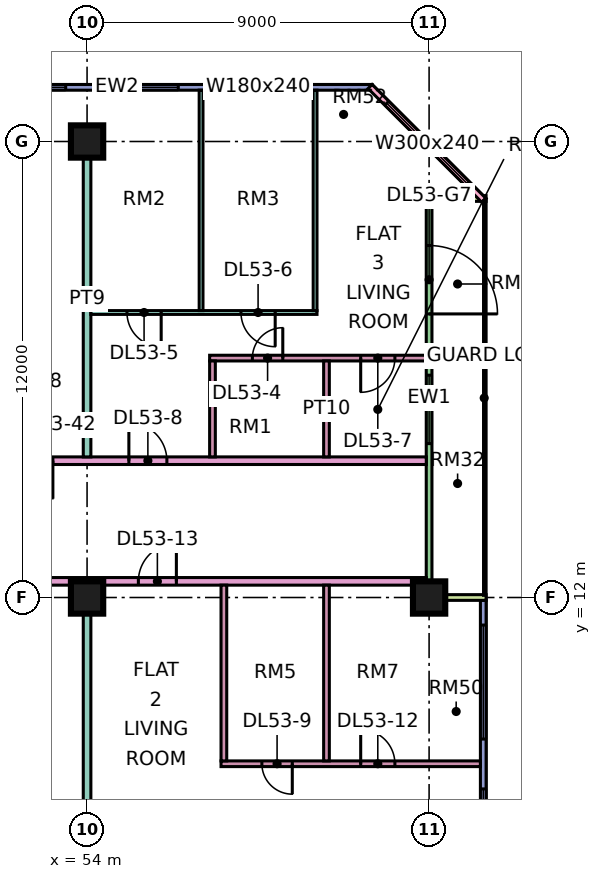
"""IFC4 building model, lengths in metres.
Left out: names, types, materials, properties, quantities, classifications, styles, units other than length and angle.
Written with IfcOpenShell. Run it as: python <this file> out.ifc"""

import sys

from ifc_helpers import new_model, si_unit, direction, frame, frame_2d, origin, origin_2d, place, context, subcontext, project, spatial, rectangle, extrude, element, fill, save


model = new_model("IFC4")
c1 = context("Model", 3, precision=1e-05, world=origin(), true_north=direction((0.0, 1.0)))
c2 = subcontext(c1, "Body", "Model", "MODEL_VIEW")
j1 = project(units=[si_unit("LENGTHUNIT", "METRE"), si_unit("PLANEANGLEUNIT", "RADIAN")], contexts=[c1])
p1 = place(None, origin())
s1 = spatial("IfcSite", under=j1, at=p1, CompositionType="ELEMENT")
p2 = place(p1, origin())
s2 = spatial("IfcBuilding", under=s1, at=p2, CompositionType="ELEMENT")
p3 = place(p2, frame((0.0, 0.0, 226.65)))
s3 = spatial("IfcBuildingStorey", under=s2, at=p3, CompositionType="ELEMENT", Elevation=226.65)
for number, where, z_axis, x_axis in (
    (1, (54.0, 12.0, 0.0), (0.0, 0.0, 1.0), (1.0, 0.0, 0.0)),
    (2, (54.0, 24.0, 0.0), (0.0, 0.0, 1.0), (1.0, 0.0, 0.0)),
    (3, (63.0, 12.0, 0.0), (0.0, 0.0, 1.0), (1.0, 0.0, 0.0)),
):
    element("IfcColumn", number, at=place(p3, frame(where, z_axis=z_axis, x_axis=x_axis)), inside=s3, PredefinedType="COLUMN", context=c2, shape_type="SweptSolid", body=[
        extrude(rectangle(XDim=0.85, YDim=0.85, at=origin_2d()), origin(), (0.0, 0.0, 1.0), 3.75),
    ])
p4 = place(p3, frame((61.5, 25.425, 0.0), z_axis=(0.0, 0.0, 1.0), x_axis=(-1.0, 0.0, 0.0)))
e4 = element("IfcWall", 4, at=p4, inside=s3, PredefinedType="SOLIDWALL", context=c2, shape_type="SweptSolid", body=[
    extrude(rectangle(XDim=13.425, YDim=0.15, at=frame_2d((6.712, 0.0))), origin(), (0.0, 0.0, 1.0), 3.35),
])
p5 = place(p4, frame((2.1, 0.0, 0.45)))
e5 = element("IfcOpeningElement", 5, at=p5, cuts=e4, PredefinedType="OPENING", context=c2, shape_type="SweptSolid", body=[
    extrude(rectangle(XDim=1.8, YDim=2.4, at=frame_2d((0.9, 1.2))), frame((0.0, 0.085, 0.0), z_axis=(0.0, -1.0, 0.0), x_axis=(1.0, 0.0, 0.0)), (0.0, 0.0, 1.0), 0.17),
])
p6 = place(p4, frame((5.1, 0.0, 0.45)))
e6 = element("IfcOpeningElement", 6, at=p6, cuts=e4, PredefinedType="OPENING", context=c2, shape_type="SweptSolid", body=[
    extrude(rectangle(XDim=1.8, YDim=2.4, at=frame_2d((0.9, 1.2))), frame((0.0, 0.085, 0.0), z_axis=(0.0, -1.0, 0.0), x_axis=(1.0, 0.0, 0.0)), (0.0, 0.0, 1.0), 0.17),
])
p7 = place(p4, frame((8.062, 0.0, 0.45)))
e7 = element("IfcOpeningElement", 7, at=p7, cuts=e4, PredefinedType="OPENING", context=c2, shape_type="SweptSolid", body=[
    extrude(rectangle(XDim=4.8, YDim=2.4, at=frame_2d((2.4, 1.2))), frame((0.0, 0.085, 0.0), z_axis=(0.0, -1.0, 0.0), x_axis=(1.0, 0.0, 0.0)), (0.0, 0.0, 1.0), 0.17),
])
p8 = place(p3, frame((64.425, 1.5, 0.0), z_axis=(0.0, 0.0, 1.0), x_axis=(0.0, 1.0, 0.0)))
e8 = element("IfcWall", 8, at=p8, inside=s3, PredefinedType="SOLIDWALL", context=c2, shape_type="SweptSolid", body=[
    extrude(rectangle(XDim=10.425, YDim=0.15, at=frame_2d((5.212, 0.0))), origin(), (0.0, 0.0, 1.0), 3.35),
])
p9 = place(p8, frame((0.663, 0.0, 0.45)))
e9 = element("IfcOpeningElement", 9, at=p9, cuts=e8, PredefinedType="OPENING", context=c2, shape_type="SweptSolid", body=[
    extrude(rectangle(XDim=4.8, YDim=2.4, at=frame_2d((2.4, 1.2))), frame((0.0, 0.085, 0.0), z_axis=(0.0, -1.0, 0.0), x_axis=(1.0, 0.0, 0.0)), (0.0, 0.0, 1.0), 0.17),
])
p10 = place(p8, frame((6.775, 0.0, 0.45)))
e10 = element("IfcOpeningElement", 10, at=p10, cuts=e8, PredefinedType="OPENING", context=c2, shape_type="SweptSolid", body=[
    extrude(rectangle(XDim=3.0, YDim=2.4, at=frame_2d((1.5, 1.2))), frame((0.0, 0.085, 0.0), z_axis=(0.0, -1.0, 0.0), x_axis=(1.0, 0.0, 0.0)), (0.0, 0.0, 1.0), 0.17),
])
p11 = place(p3, frame((63.0, 12.075, 0.0), z_axis=(0.0, 0.0, 1.0), x_axis=(0.0, 1.0, 0.0)))
e11 = element("IfcWall", 11, at=p11, inside=s3, PredefinedType="SOLIDWALL", context=c2, shape_type="SweptSolid", body=[
    extrude(rectangle(XDim=10.35, YDim=0.15, at=frame_2d((5.175, 0.0))), origin(), (0.0, 0.0, 1.0), 3.35),
])
p12 = place(p11, frame((3.975, 0.0, 0.45)))
e12 = element("IfcOpeningElement", 12, at=p12, cuts=e11, PredefinedType="OPENING", context=c2, shape_type="SweptSolid", body=[
    extrude(rectangle(XDim=1.8, YDim=2.4, at=frame_2d((0.9, 1.2))), frame((0.0, 0.085, 0.0), z_axis=(0.0, -1.0, 0.0), x_axis=(1.0, 0.0, 0.0)), (0.0, 0.0, 1.0), 0.17),
])
p13 = place(p11, frame((7.387, 0.0, 0.0)))
e13 = element("IfcOpeningElement", 13, at=p13, cuts=e11, PredefinedType="OPENING", context=c2, shape_type="SweptSolid", body=[
    extrude(rectangle(XDim=1.8, YDim=2.4, at=frame_2d((0.9, 1.2))), frame((0.0, 0.085, 0.0), z_axis=(0.0, -1.0, 0.0), x_axis=(1.0, 0.0, 0.0)), (0.0, 0.0, 1.0), 0.17),
])
for number, where, z_axis, x_axis in (
    (14, (64.5, 12.0, 0.0), (0.0, 0.0, 1.0), (-1.0, 0.0, 0.0)),
    (15, (64.5, 22.5, 0.0), (0.0, 0.0, 1.0), (-1.0, 0.0, 0.0)),
):
    element("IfcWall", number, at=place(p3, frame(where, z_axis=z_axis, x_axis=x_axis)), inside=s3, PredefinedType="SOLIDWALL", context=c2, shape_type="SweptSolid", body=[
        extrude(rectangle(XDim=1.5, YDim=0.15, at=frame_2d((0.75, 0.0))), origin(), (0.0, 0.0, 1.0), 3.35),
    ])
p14 = place(p3, frame((64.447, 22.447, 0.0), z_axis=(0.0, 0.0, 1.0), x_axis=(-0.707106781187, 0.707106781187, 0.0)))
e16 = element("IfcWall", 16, at=p14, inside=s3, PredefinedType="SOLIDWALL", context=c2, shape_type="SweptSolid", body=[
    extrude(rectangle(XDim=4.243, YDim=0.15, at=frame_2d((2.121, 0.0))), origin(), (0.0, 0.0, 1.0), 3.35),
])
p15 = place(p14, frame((0.621, 0.0, 0.45)))
e17 = element("IfcOpeningElement", 17, at=p15, cuts=e16, PredefinedType="OPENING", context=c2, shape_type="SweptSolid", body=[
    extrude(rectangle(XDim=3.0, YDim=2.4, at=frame_2d((1.5, 1.2))), frame((0.0, 0.085, 0.0), z_axis=(0.0, -1.0, 0.0), x_axis=(1.0, 0.0, 0.0)), (0.0, 0.0, 1.0), 0.17),
])
p16 = place(p3, frame((40.65, 12.425, 0.0), z_axis=(0.0, 0.0, 1.0), x_axis=(1.0, 0.0, 0.0)))
e18 = element("IfcWall", 18, at=p16, inside=s3, PredefinedType="PARTITIONING", context=c2, shape_type="SweptSolid", body=[
    extrude(rectangle(XDim=22.276, YDim=0.2, at=frame_2d((11.138, 0.0))), origin(), (0.0, 0.0, 1.0), 3.35),
])
p17 = place(p16, frame((14.7, 0.0, 0.0)))
e19 = element("IfcOpeningElement", 19, at=p17, cuts=e18, PredefinedType="OPENING", context=c2, shape_type="SweptSolid", body=[
    extrude(rectangle(XDim=1.0, YDim=2.1, at=frame_2d((0.5, 1.05))), frame((0.0, 0.11, 0.0), z_axis=(0.0, -1.0, 0.0), x_axis=(1.0, 0.0, 0.0)), (0.0, 0.0, 1.0), 0.22),
])
p18 = place(p16, frame((1.05, 0.0, 0.0)))
e20 = element("IfcOpeningElement", 20, at=p18, cuts=e18, PredefinedType="OPENING", context=c2, shape_type="SweptSolid", body=[
    extrude(rectangle(XDim=1.0, YDim=2.1, at=frame_2d((0.5, 1.05))), frame((0.0, 0.11, 0.0), z_axis=(0.0, -1.0, 0.0), x_axis=(1.0, 0.0, 0.0)), (0.0, 0.0, 1.0), 0.22),
])
p19 = place(p3, frame((51.225, 15.6, 0.0), z_axis=(0.0, 0.0, 1.0), x_axis=(1.0, 0.0, 0.0)))
e21 = element("IfcWall", 21, at=p19, inside=s3, PredefinedType="PARTITIONING", context=c2, shape_type="SweptSolid", body=[
    extrude(rectangle(XDim=11.701, YDim=0.2, at=frame_2d((5.851, 0.0))), origin(), (0.0, 0.0, 1.0), 3.35),
])
p20 = place(p19, frame((3.875, 0.0, 0.0)))
e22 = element("IfcOpeningElement", 22, at=p20, cuts=e21, PredefinedType="OPENING", context=c2, shape_type="SweptSolid", body=[
    extrude(rectangle(XDim=1.0, YDim=2.1, at=frame_2d((0.5, 1.05))), frame((0.0, 0.11, 0.0), z_axis=(0.0, -1.0, 0.0), x_axis=(1.0, 0.0, 0.0)), (0.0, 0.0, 1.0), 0.22),
])
p21 = place(p19, frame((0.875, 0.0, 0.0)))
e23 = element("IfcOpeningElement", 23, at=p21, cuts=e21, PredefinedType="OPENING", context=c2, shape_type="SweptSolid", body=[
    extrude(rectangle(XDim=1.0, YDim=2.1, at=frame_2d((0.5, 1.05))), frame((0.0, 0.11, 0.0), z_axis=(0.0, -1.0, 0.0), x_axis=(1.0, 0.0, 0.0)), (0.0, 0.0, 1.0), 0.22),
])
p22 = place(p3, frame((54.0, -1.351, 0.0), z_axis=(0.0, 0.0, 1.0), x_axis=(0.0, 1.0, 0.0)))
e24 = element("IfcWall", 24, at=p22, inside=s3, PredefinedType="PARTITIONING", context=c2, shape_type="SweptSolid", body=[
    extrude(rectangle(XDim=13.676, YDim=0.2, at=frame_2d((6.838, 0.0))), origin(), (0.0, 0.0, 1.0), 3.35),
])
p23 = place(p3, frame((54.0, 15.7, 0.0), z_axis=(0.0, 0.0, 1.0), x_axis=(0.0, 1.0, 0.0)))
e25 = element("IfcWall", 25, at=p23, inside=s3, PredefinedType="PARTITIONING", context=c2, shape_type="SweptSolid", body=[
    extrude(rectangle(XDim=8.3, YDim=0.2, at=frame_2d((4.15, 0.0))), origin(), (0.0, 0.0, 1.0), 3.35),
])
p24 = place(p3, frame((54.1, 19.5, 0.0), z_axis=(0.0, 0.0, 1.0), x_axis=(1.0, 0.0, 0.0)))
e26 = element("IfcWall", 26, at=p24, inside=s3, PredefinedType="PARTITIONING", context=c2, shape_type="SweptSolid", body=[
    extrude(rectangle(XDim=5.95, YDim=0.1, at=frame_2d((2.975, 0.0))), origin(), (0.0, 0.0, 1.0), 3.35),
])
p25 = place(p24, frame((0.95, 0.0, 0.0)))
e27 = element("IfcOpeningElement", 27, at=p25, cuts=e26, PredefinedType="OPENING", context=c2, shape_type="SweptSolid", body=[
    extrude(rectangle(XDim=0.9, YDim=2.1, at=frame_2d((0.45, 1.05))), frame((0.0, 0.06, 0.0), z_axis=(0.0, -1.0, 0.0), x_axis=(1.0, 0.0, 0.0)), (0.0, 0.0, 1.0), 0.12),
])
p26 = place(p24, frame((3.95, 0.0, 0.0)))
e28 = element("IfcOpeningElement", 28, at=p26, cuts=e26, PredefinedType="OPENING", context=c2, shape_type="SweptSolid", body=[
    extrude(rectangle(XDim=0.9, YDim=2.1, at=frame_2d((0.45, 1.05))), frame((0.0, 0.06, 0.0), z_axis=(0.0, -1.0, 0.0), x_axis=(1.0, 0.0, 0.0)), (0.0, 0.0, 1.0), 0.12),
])
p27 = place(p3, frame((57.0, 19.55, 0.0), z_axis=(0.0, 0.0, 1.0), x_axis=(0.0, 1.0, 0.0)))
e29 = element("IfcWall", 29, at=p27, inside=s3, PredefinedType="PARTITIONING", context=c2, shape_type="SweptSolid", body=[
    extrude(rectangle(XDim=5.801, YDim=0.1, at=frame_2d((2.9, 0.0))), origin(), (0.0, 0.0, 1.0), 3.35),
])
p28 = place(p3, frame((57.225, 18.3, 0.0), z_axis=(0.0, 0.0, 1.0), x_axis=(1.0, 0.0, 0.0)))
e30 = element("IfcWall", 30, at=p28, inside=s3, PredefinedType="PARTITIONING", context=c2, shape_type="SweptSolid", body=[
    extrude(rectangle(XDim=5.701, YDim=0.15, at=frame_2d((2.851, 0.0))), origin(), (0.0, 0.0, 1.0), 3.35),
])
p29 = place(p28, frame((1.125, 0.0, 0.0)))
e31 = element("IfcOpeningElement", 31, at=p29, cuts=e30, PredefinedType="OPENING", context=c2, shape_type="SweptSolid", body=[
    extrude(rectangle(XDim=0.8, YDim=2.1, at=frame_2d((0.4, 1.05))), frame((0.0, 0.085, 0.0), z_axis=(0.0, -1.0, 0.0), x_axis=(1.0, 0.0, 0.0)), (0.0, 0.0, 1.0), 0.17),
])
p30 = place(p28, frame((3.975, 0.0, 0.0)))
e32 = element("IfcOpeningElement", 32, at=p30, cuts=e30, PredefinedType="OPENING", context=c2, shape_type="SweptSolid", body=[
    extrude(rectangle(XDim=0.9, YDim=2.1, at=frame_2d((0.45, 1.05))), frame((0.0, 0.085, 0.0), z_axis=(0.0, -1.0, 0.0), x_axis=(1.0, 0.0, 0.0)), (0.0, 0.0, 1.0), 0.17),
])
p31 = place(p3, frame((57.3, 15.7, 0.0), z_axis=(0.0, 0.0, 1.0), x_axis=(0.0, 1.0, 0.0)))
e33 = element("IfcWall", 33, at=p31, inside=s3, PredefinedType="PARTITIONING", context=c2, shape_type="SweptSolid", body=[
    extrude(rectangle(XDim=2.525, YDim=0.15, at=frame_2d((1.263, 0.0))), origin(), (0.0, 0.0, 1.0), 3.35),
])
p32 = place(p3, frame((57.525, 7.625, 0.0), z_axis=(0.0, 0.0, 1.0), x_axis=(1.0, 0.0, 0.0)))
e34 = element("IfcWall", 34, at=p32, inside=s3, PredefinedType="PARTITIONING", context=c2, shape_type="SweptSolid", body=[
    extrude(rectangle(XDim=6.825, YDim=0.15, at=frame_2d((3.413, 0.0))), origin(), (0.0, 0.0, 1.0), 3.35),
])
p33 = place(p32, frame((1.075, 0.0, 0.0)))
e35 = element("IfcOpeningElement", 35, at=p33, cuts=e34, PredefinedType="OPENING", context=c2, shape_type="SweptSolid", body=[
    extrude(rectangle(XDim=0.8, YDim=2.1, at=frame_2d((0.4, 1.05))), frame((0.0, 0.085, 0.0), z_axis=(0.0, -1.0, 0.0), x_axis=(1.0, 0.0, 0.0)), (0.0, 0.0, 1.0), 0.17),
])
p34 = place(p32, frame((3.675, 0.0, 0.0)))
e36 = element("IfcOpeningElement", 36, at=p34, cuts=e34, PredefinedType="OPENING", context=c2, shape_type="SweptSolid", body=[
    extrude(rectangle(XDim=0.9, YDim=2.1, at=frame_2d((0.45, 1.05))), frame((0.0, 0.085, 0.0), z_axis=(0.0, -1.0, 0.0), x_axis=(1.0, 0.0, 0.0)), (0.0, 0.0, 1.0), 0.17),
])
p35 = place(p3, frame((57.6, 7.7, 0.0), z_axis=(0.0, 0.0, 1.0), x_axis=(0.0, 1.0, 0.0)))
e37 = element("IfcWall", 37, at=p35, inside=s3, PredefinedType="PARTITIONING", context=c2, shape_type="SweptSolid", body=[
    extrude(rectangle(XDim=4.625, YDim=0.15, at=frame_2d((2.312, 0.0))), origin(), (0.0, 0.0, 1.0), 3.35),
])
p36 = place(p3, frame((60.0, 19.55, 0.0), z_axis=(0.0, 0.0, 1.0), x_axis=(0.0, 1.0, 0.0)))
e38 = element("IfcWall", 38, at=p36, inside=s3, PredefinedType="PARTITIONING", context=c2, shape_type="SweptSolid", body=[
    extrude(rectangle(XDim=5.8, YDim=0.1, at=frame_2d((2.9, 0.0))), origin(), (0.0, 0.0, 1.0), 3.35),
])
p37 = place(p3, frame((60.3, 7.7, 0.0), z_axis=(0.0, 0.0, 1.0), x_axis=(0.0, 1.0, 0.0)))
e39 = element("IfcWall", 39, at=p37, inside=s3, PredefinedType="PARTITIONING", context=c2, shape_type="SweptSolid", body=[
    extrude(rectangle(XDim=4.625, YDim=0.15, at=frame_2d((2.312, 0.0))), origin(), (0.0, 0.0, 1.0), 3.35),
])
p38 = place(p3, frame((60.3, 15.7, 0.0), z_axis=(0.0, 0.0, 1.0), x_axis=(0.0, 1.0, 0.0)))
e40 = element("IfcWall", 40, at=p38, inside=s3, PredefinedType="PARTITIONING", context=c2, shape_type="SweptSolid", body=[
    extrude(rectangle(XDim=2.525, YDim=0.15, at=frame_2d((1.263, 0.0))), origin(), (0.0, 0.0, 1.0), 3.35),
])
p39 = place(p5, origin())
e41 = element("IfcWindow", 41, at=p39, inside=s3, PartitioningType="SINGLE_PANEL", PredefinedType="WINDOW", context=c2, shape_type="SweptSolid", body=[
    extrude(rectangle(XDim=1.8, YDim=2.4, at=frame_2d((0.9, 1.2))), frame((0.0, 0.03, 0.0), z_axis=(0.0, -1.0, 0.0), x_axis=(1.0, 0.0, 0.0)), (0.0, 0.0, 1.0), 0.06),
])
fill(e5, e41)
p40 = place(p6, origin())
e42 = element("IfcWindow", 42, at=p40, inside=s3, PartitioningType="SINGLE_PANEL", PredefinedType="WINDOW", context=c2, shape_type="SweptSolid", body=[
    extrude(rectangle(XDim=1.8, YDim=2.4, at=frame_2d((0.9, 1.2))), frame((0.0, 0.03, 0.0), z_axis=(0.0, -1.0, 0.0), x_axis=(1.0, 0.0, 0.0)), (0.0, 0.0, 1.0), 0.06),
])
fill(e6, e42)
p41 = place(p7, origin())
e43 = element("IfcWindow", 43, at=p41, inside=s3, PartitioningType="SINGLE_PANEL", PredefinedType="WINDOW", context=c2, shape_type="SweptSolid", body=[
    extrude(rectangle(XDim=4.8, YDim=2.4, at=frame_2d((2.4, 1.2))), frame((0.0, 0.03, 0.0), z_axis=(0.0, -1.0, 0.0), x_axis=(1.0, 0.0, 0.0)), (0.0, 0.0, 1.0), 0.06),
])
fill(e7, e43)
p42 = place(p9, origin())
e44 = element("IfcWindow", 44, at=p42, inside=s3, PartitioningType="SINGLE_PANEL", PredefinedType="WINDOW", context=c2, shape_type="SweptSolid", body=[
    extrude(rectangle(XDim=4.8, YDim=2.4, at=frame_2d((2.4, 1.2))), frame((0.0, 0.03, 0.0), z_axis=(0.0, -1.0, 0.0), x_axis=(1.0, 0.0, 0.0)), (0.0, 0.0, 1.0), 0.06),
])
fill(e9, e44)
p43 = place(p10, origin())
e45 = element("IfcWindow", 45, at=p43, inside=s3, PartitioningType="SINGLE_PANEL", PredefinedType="WINDOW", context=c2, shape_type="SweptSolid", body=[
    extrude(rectangle(XDim=3.0, YDim=2.4, at=frame_2d((1.5, 1.2))), frame((0.0, 0.03, 0.0), z_axis=(0.0, -1.0, 0.0), x_axis=(1.0, 0.0, 0.0)), (0.0, 0.0, 1.0), 0.06),
])
fill(e10, e45)
p44 = place(p12, origin())
e46 = element("IfcWindow", 46, at=p44, inside=s3, PartitioningType="SINGLE_PANEL", PredefinedType="WINDOW", context=c2, shape_type="SweptSolid", body=[
    extrude(rectangle(XDim=1.8, YDim=2.4, at=frame_2d((0.9, 1.2))), frame((0.0, 0.03, 0.0), z_axis=(0.0, -1.0, 0.0), x_axis=(1.0, 0.0, 0.0)), (0.0, 0.0, 1.0), 0.06),
])
fill(e12, e46)
p45 = place(p13, frame((1.8, 0.0, 0.0), z_axis=(0.0, 0.0, 1.0), x_axis=(-1.0, 0.0, 0.0)))
e47 = element("IfcDoor", 47, at=p45, inside=s3, OperationType="DOUBLE_DOOR_SINGLE_SWING", PredefinedType="DOOR", context=c2, shape_type="SweptSolid", body=[
    extrude(rectangle(XDim=1.8, YDim=2.4, at=frame_2d((0.9, 1.2))), frame((0.0, 0.025, 0.0), z_axis=(0.0, -1.0, 0.0), x_axis=(1.0, 0.0, 0.0)), (0.0, 0.0, 1.0), 0.05),
])
fill(e13, e47)
p46 = place(p15, origin())
e48 = element("IfcWindow", 48, at=p46, inside=s3, PartitioningType="SINGLE_PANEL", PredefinedType="WINDOW", context=c2, shape_type="SweptSolid", body=[
    extrude(rectangle(XDim=3.0, YDim=2.4, at=frame_2d((1.5, 1.2))), frame((0.0, 0.03, 0.0), z_axis=(0.0, -1.0, 0.0), x_axis=(1.0, 0.0, 0.0)), (0.0, 0.0, 1.0), 0.06),
])
fill(e17, e48)
p47 = place(p29, frame((0.8, 0.0, 0.0), z_axis=(0.0, 0.0, 1.0), x_axis=(-1.0, 0.0, 0.0)))
e49 = element("IfcDoor", 49, at=p47, inside=s3, OperationType="SINGLE_SWING_RIGHT", PredefinedType="DOOR", context=c2, shape_type="SweptSolid", body=[
    extrude(rectangle(XDim=0.8, YDim=2.1, at=frame_2d((0.4, 1.05))), frame((0.0, 0.025, 0.0), z_axis=(0.0, -1.0, 0.0), x_axis=(1.0, 0.0, 0.0)), (0.0, 0.0, 1.0), 0.05),
])
fill(e31, e49)
p48 = place(p25, origin())
e50 = element("IfcDoor", 50, at=p48, inside=s3, OperationType="SINGLE_SWING_RIGHT", PredefinedType="DOOR", context=c2, shape_type="SweptSolid", body=[
    extrude(rectangle(XDim=0.9, YDim=2.1, at=frame_2d((0.45, 1.05))), frame((0.0, 0.025, 0.0), z_axis=(0.0, -1.0, 0.0), x_axis=(1.0, 0.0, 0.0)), (0.0, 0.0, 1.0), 0.05),
])
fill(e27, e50)
p49 = place(p26, origin())
e51 = element("IfcDoor", 51, at=p49, inside=s3, OperationType="SINGLE_SWING_RIGHT", PredefinedType="DOOR", context=c2, shape_type="SweptSolid", body=[
    extrude(rectangle(XDim=0.9, YDim=2.1, at=frame_2d((0.45, 1.05))), frame((0.0, 0.025, 0.0), z_axis=(0.0, -1.0, 0.0), x_axis=(1.0, 0.0, 0.0)), (0.0, 0.0, 1.0), 0.05),
])
fill(e28, e51)
p50 = place(p30, frame((0.9, 0.0, 0.0), z_axis=(0.0, 0.0, 1.0), x_axis=(-1.0, 0.0, 0.0)))
e52 = element("IfcDoor", 52, at=p50, inside=s3, OperationType="SINGLE_SWING_LEFT", PredefinedType="DOOR", context=c2, shape_type="SweptSolid", body=[
    extrude(rectangle(XDim=0.9, YDim=2.1, at=frame_2d((0.45, 1.05))), frame((0.0, 0.025, 0.0), z_axis=(0.0, -1.0, 0.0), x_axis=(1.0, 0.0, 0.0)), (0.0, 0.0, 1.0), 0.05),
])
fill(e32, e52)
p51 = place(p20, origin())
e53 = element("IfcDoor", 53, at=p51, inside=s3, OperationType="SINGLE_SWING_LEFT", PredefinedType="DOOR", context=c2, shape_type="SweptSolid", body=[
    extrude(rectangle(XDim=1.0, YDim=2.1, at=frame_2d((0.5, 1.05))), frame((0.0, 0.025, 0.0), z_axis=(0.0, -1.0, 0.0), x_axis=(1.0, 0.0, 0.0)), (0.0, 0.0, 1.0), 0.05),
])
fill(e22, e53)
p52 = place(p33, origin())
e54 = element("IfcDoor", 54, at=p52, inside=s3, OperationType="SINGLE_SWING_RIGHT", PredefinedType="DOOR", context=c2, shape_type="SweptSolid", body=[
    extrude(rectangle(XDim=0.8, YDim=2.1, at=frame_2d((0.4, 1.05))), frame((0.0, 0.025, 0.0), z_axis=(0.0, -1.0, 0.0), x_axis=(1.0, 0.0, 0.0)), (0.0, 0.0, 1.0), 0.05),
])
fill(e35, e54)
p53 = place(p34, origin())
e55 = element("IfcDoor", 55, at=p53, inside=s3, OperationType="SINGLE_SWING_LEFT", PredefinedType="DOOR", context=c2, shape_type="SweptSolid", body=[
    extrude(rectangle(XDim=0.9, YDim=2.1, at=frame_2d((0.45, 1.05))), frame((0.0, 0.025, 0.0), z_axis=(0.0, -1.0, 0.0), x_axis=(1.0, 0.0, 0.0)), (0.0, 0.0, 1.0), 0.05),
])
fill(e36, e55)
p54 = place(p17, frame((1.0, 0.0, 0.0), z_axis=(0.0, 0.0, 1.0), x_axis=(-1.0, 0.0, 0.0)))
e56 = element("IfcDoor", 56, at=p54, inside=s3, OperationType="SINGLE_SWING_RIGHT", PredefinedType="DOOR", context=c2, shape_type="SweptSolid", body=[
    extrude(rectangle(XDim=1.0, YDim=2.1, at=frame_2d((0.5, 1.05))), frame((0.0, 0.025, 0.0), z_axis=(0.0, -1.0, 0.0), x_axis=(1.0, 0.0, 0.0)), (0.0, 0.0, 1.0), 0.05),
])
fill(e19, e56)
p55 = place(p21, origin())
e57 = element("IfcDoor", 57, at=p55, inside=s3, OperationType="SINGLE_SWING_RIGHT", PredefinedType="DOOR", context=c2, shape_type="SweptSolid", body=[
    extrude(rectangle(XDim=1.0, YDim=2.1, at=frame_2d((0.5, 1.05))), frame((0.0, 0.025, 0.0), z_axis=(0.0, -1.0, 0.0), x_axis=(1.0, 0.0, 0.0)), (0.0, 0.0, 1.0), 0.05),
])
fill(e23, e57)
save(model, sys.argv[1])
